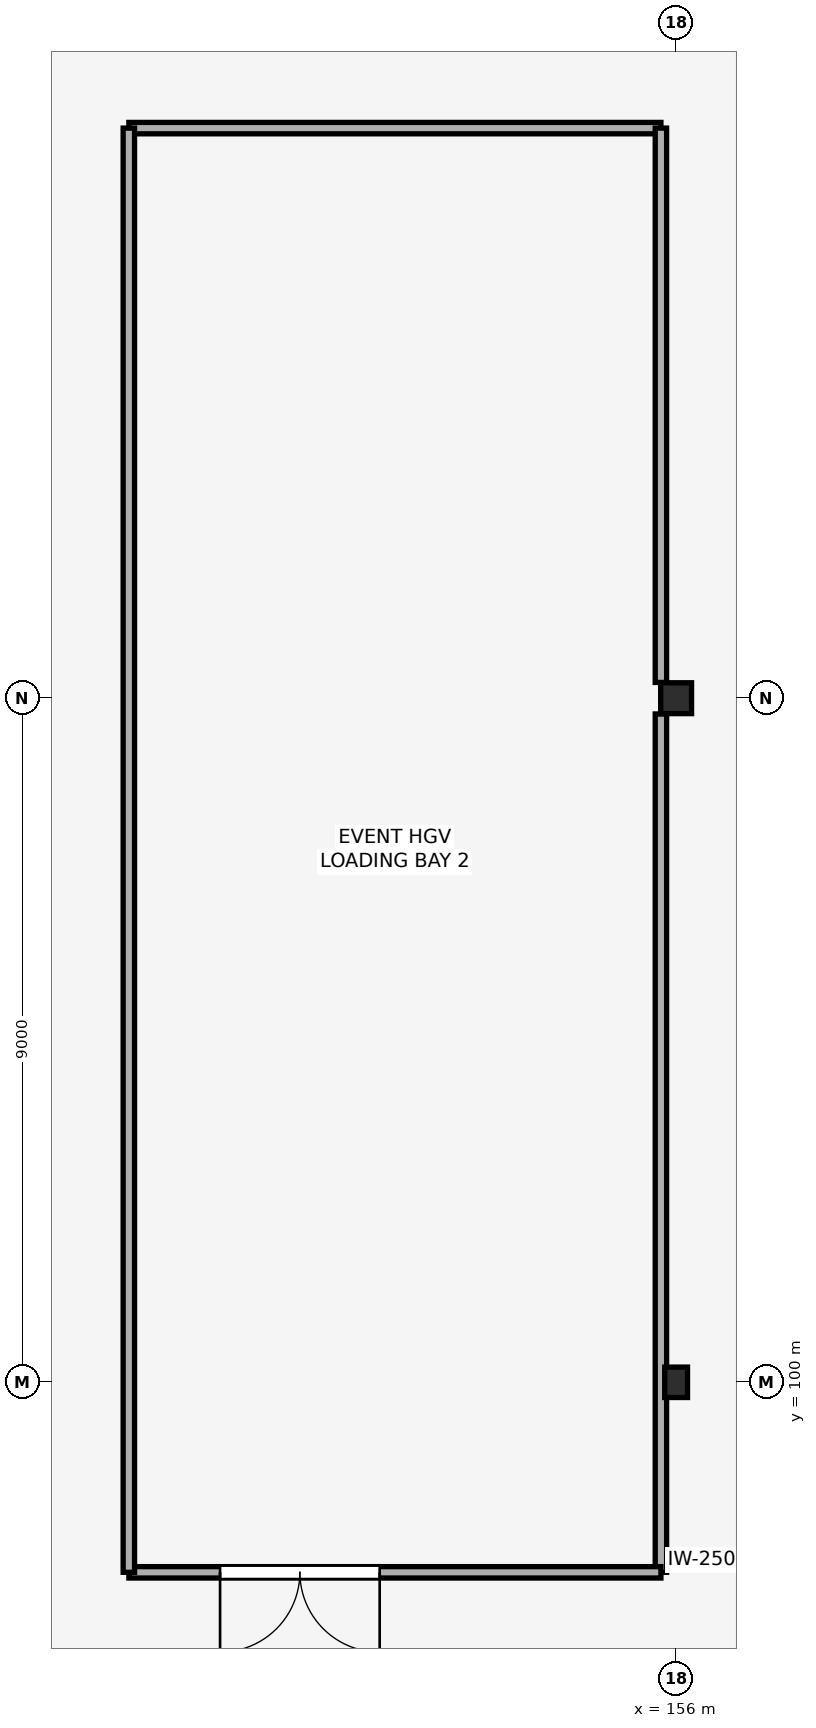
"""IFC4 building model, lengths in metres.
Left out: names, types, materials, properties, quantities, classifications, styles, units other than length and angle.
Written with IfcOpenShell. Run it as: python <this file> out.ifc"""

import sys

from ifc_helpers import new_model, si_unit, direction, frame, frame_2d, origin, origin_2d, place, context, subcontext, project, spatial, rectangle, hollow_circle, i_section, extrude, element, fill, save


model = new_model("IFC4")
c1 = context("Model", 3, precision=1e-05, world=origin(), true_north=direction((0.0, 1.0)))
c2 = subcontext(c1, "Body", "Model", "MODEL_VIEW")
j1 = project(units=[si_unit("LENGTHUNIT", "METRE"), si_unit("PLANEANGLEUNIT", "RADIAN")], contexts=[c1])
p1 = place(None, origin())
s1 = spatial("IfcSite", under=j1, at=p1, CompositionType="ELEMENT")
p2 = place(p1, origin())
s2 = spatial("IfcBuilding", under=s1, at=p2, CompositionType="ELEMENT")
p3 = place(p2, origin())
s3 = spatial("IfcBuildingStorey", under=s2, at=p3, CompositionType="ELEMENT", Elevation=0.0)
p4 = place(p3, frame((156.0, 100.0, 0.0), z_axis=(0.0, 0.0, 1.0), x_axis=(1.0, 0.0, 0.0)))
e1 = element("IfcColumn", 1, at=p4, inside=s3, PredefinedType="COLUMN", context=c2, shape_type="SweptSolid", body=[
    extrude(i_section(OverallWidth=0.3, OverallDepth=0.4, WebThickness=0.013, FlangeThickness=0.024, FilletRadius=0.027, at=origin_2d()), origin(), (0.0, 0.0, 1.0), 5.4),
])
p5 = place(p3, frame((156.0, 109.0, 0.0), z_axis=(0.0, 0.0, 1.0), x_axis=(1.0, 0.0, 0.0)))
e2 = element("IfcColumn", 2, at=p5, inside=s3, PredefinedType="COLUMN", context=c2, shape_type="SweptSolid", body=[
    extrude(hollow_circle(Radius=0.203, WallThickness=0.016, at=origin_2d()), origin(), (0.0, 0.0, 1.0), 5.4),
])
p6 = place(p3, frame((148.8, 116.5, 0.0), z_axis=(0.0, 0.0, 1.0), x_axis=(1.0, 0.0, 0.0)))
e3 = element("IfcWall", 3, at=p6, inside=s3, PredefinedType="PARTITIONING", context=c2, shape_type="SweptSolid", body=[
    extrude(rectangle(XDim=7.0, YDim=0.15, at=frame_2d((3.5, 0.0))), origin(), (0.0, 0.0, 1.0), 5.12),
])
p7 = place(p3, frame((155.8, 116.5, 0.0), z_axis=(0.0, 0.0, 1.0), x_axis=(0.0, -1.0, 0.0)))
e4 = element("IfcWall", 4, at=p7, inside=s3, PredefinedType="PARTITIONING", context=c2, shape_type="SweptSolid", body=[
    extrude(rectangle(XDim=7.293, YDim=0.15, at=frame_2d((3.646, 0.0))), origin(), (0.0, 0.0, 1.0), 4.507),
])
p8 = place(p3, frame((155.8, 108.793, 0.0), z_axis=(0.0, 0.0, 1.0), x_axis=(0.0, -1.0, 0.0)))
e5 = element("IfcWall", 5, at=p8, inside=s3, PredefinedType="PARTITIONING", context=c2, shape_type="SweptSolid", body=[
    extrude(rectangle(XDim=11.293, YDim=0.15, at=frame_2d((5.646, 0.0))), origin(), (0.0, 0.0, 1.0), 4.507),
])
p9 = place(p3, frame((155.8, 97.5, 0.0), z_axis=(0.0, 0.0, 1.0), x_axis=(-1.0, 0.0, 0.0)))
e6 = element("IfcWall", 6, at=p9, inside=s3, PredefinedType="PARTITIONING", context=c2, shape_type="SweptSolid", body=[
    extrude(rectangle(XDim=7.0, YDim=0.15, at=frame_2d((3.5, 0.0))), origin(), (0.0, 0.0, 1.0), 5.12),
])
p10 = place(p9, frame((3.7, 0.0, 0.0)))
e7 = element("IfcOpeningElement", 7, at=p10, cuts=e6, PredefinedType="OPENING", context=c2, shape_type="SweptSolid", body=[
    extrude(rectangle(XDim=2.1, YDim=2.4, at=frame_2d((1.05, 1.2))), frame((0.0, 0.085, 0.0), z_axis=(0.0, -1.0, 0.0), x_axis=(1.0, 0.0, 0.0)), (0.0, 0.0, 1.0), 0.17),
])
p11 = place(p3, frame((148.8, 97.5, 0.0), z_axis=(0.0, 0.0, 1.0), x_axis=(0.0, 1.0, 0.0)))
e8 = element("IfcWall", 8, at=p11, inside=s3, PredefinedType="PARTITIONING", context=c2, shape_type="SweptSolid", body=[
    extrude(rectangle(XDim=19.0, YDim=0.15, at=frame_2d((9.5, 0.0))), origin(), (0.0, 0.0, 1.0), 5.12),
])
p12 = place(p10, origin())
e9 = element("IfcDoor", 9, at=p12, inside=s3, OperationType="DOUBLE_DOOR_SINGLE_SWING", PredefinedType="DOOR", context=c2, shape_type="SweptSolid", body=[
    extrude(rectangle(XDim=2.1, YDim=2.4, at=frame_2d((1.05, 1.2))), frame((0.0, 0.025, 0.0), z_axis=(0.0, -1.0, 0.0), x_axis=(1.0, 0.0, 0.0)), (0.0, 0.0, 1.0), 0.05),
])
fill(e7, e9)
save(model, sys.argv[1])
